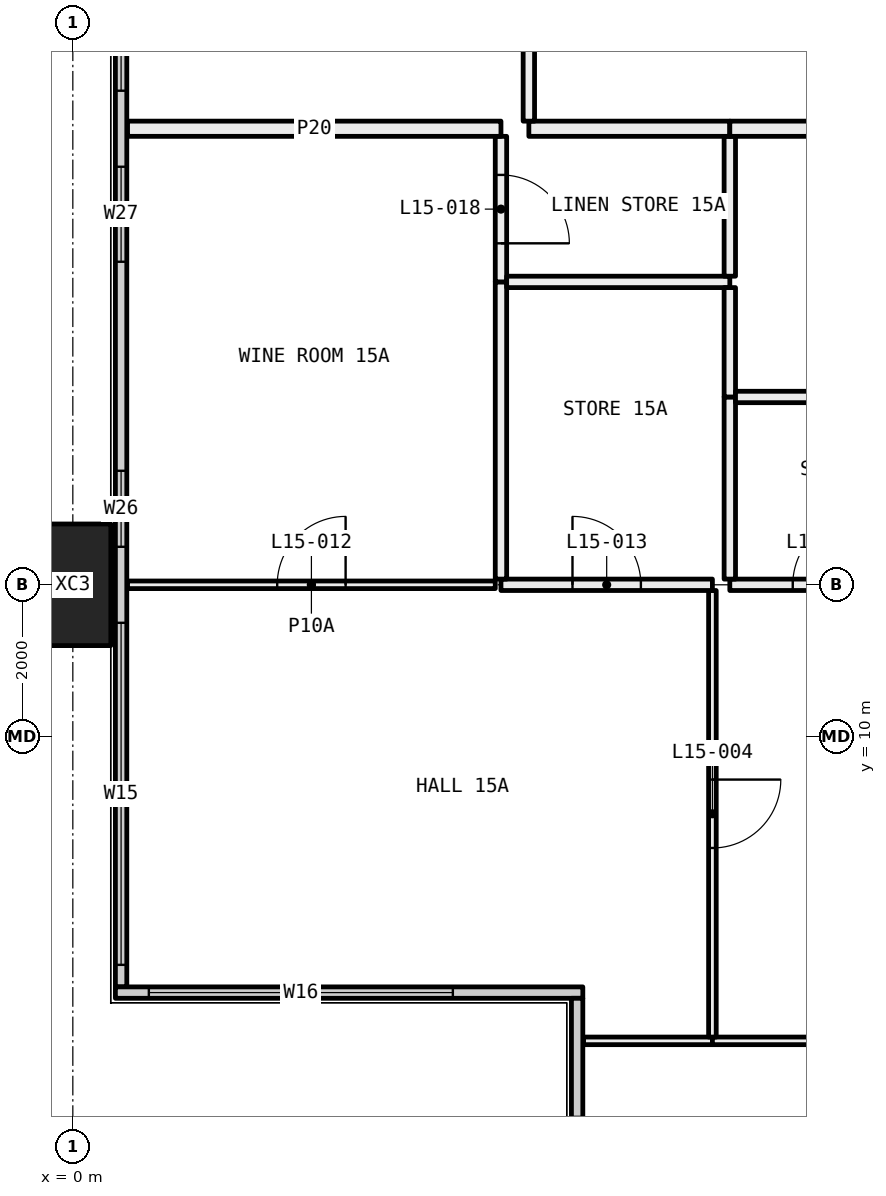
"""IFC4 building model, lengths in metres.
Left out: names, types, materials, properties, quantities, classifications, styles, units other than length and angle.
Written with IfcOpenShell. Run it as: python <this file> out.ifc"""

import sys

from ifc_helpers import new_model, si_unit, direction, frame, frame_2d, origin, origin_2d, place, context, subcontext, project, spatial, rectangle, hollow_rectangle, extrude, element, fill, save


model = new_model("IFC4")
c1 = context("Model", 3, precision=1e-05, world=origin(), true_north=direction((0.0, 1.0)))
c2 = subcontext(c1, "Body", "Model", "MODEL_VIEW")
j1 = project(units=[si_unit("LENGTHUNIT", "METRE"), si_unit("PLANEANGLEUNIT", "RADIAN")], contexts=[c1])
p1 = place(None, origin())
s1 = spatial("IfcSite", under=j1, at=p1, CompositionType="ELEMENT")
p2 = place(p1, origin())
s2 = spatial("IfcBuilding", under=s1, at=p2, CompositionType="ELEMENT")
p3 = place(p2, frame((0.0, 0.0, 64.5)))
s3 = spatial("IfcBuildingStorey", under=s2, at=p3, CompositionType="ELEMENT", Elevation=64.5)
p4 = place(p3, frame((0.0, 12.0, -0.4), z_axis=(0.0, 0.0, 1.0), x_axis=(0.0, 1.0, 0.0)))
e1 = element("IfcColumn", 1, at=p4, inside=s3, PredefinedType="COLUMN", context=c2, shape_type="SweptSolid", body=[
    extrude(hollow_rectangle(XDim=1.6, YDim=1.0, WallThickness=0.065, at=origin_2d()), origin(), (0.0, 0.0, 1.0), 3.45),
])
p5 = place(p3, frame((0.635, 6.71, 0.0), z_axis=(0.0, 0.0, 1.0), x_axis=(0.0, 1.0, 0.0)))
e2 = element("IfcWall", 2, at=p5, inside=s3, PredefinedType="ELEMENTEDWALL", context=c2, shape_type="SweptSolid", body=[
    extrude(rectangle(XDim=34.58, YDim=0.15, at=frame_2d((17.29, 0.0))), origin(), (0.0, 0.0, 1.0), 3.05),
])
p6 = place(p5, frame((0.29, 0.0, 0.45)))
e3 = element("IfcOpeningElement", 3, at=p6, cuts=e2, PredefinedType="OPENING", context=c2, shape_type="SweptSolid", body=[
    extrude(rectangle(XDim=4.5, YDim=2.55, at=frame_2d((2.25, 1.275))), frame((0.0, 0.085, 0.0), z_axis=(0.0, -1.0, 0.0), x_axis=(1.0, 0.0, 0.0)), (0.0, 0.0, 1.0), 0.17),
])
p7 = place(p5, frame((5.79, 0.0, 0.45)))
e4 = element("IfcOpeningElement", 4, at=p7, cuts=e2, PredefinedType="OPENING", context=c2, shape_type="SweptSolid", body=[
    extrude(rectangle(XDim=1.0, YDim=2.55, at=frame_2d((0.5, 1.275))), frame((0.0, 0.085, 0.0), z_axis=(0.0, -1.0, 0.0), x_axis=(1.0, 0.0, 0.0)), (0.0, 0.0, 1.0), 0.17),
])
p8 = place(p5, frame((9.54, 0.0, 0.45)))
e5 = element("IfcOpeningElement", 5, at=p8, cuts=e2, PredefinedType="OPENING", context=c2, shape_type="SweptSolid", body=[
    extrude(rectangle(XDim=1.25, YDim=2.55, at=frame_2d((0.625, 1.275))), frame((0.0, 0.085, 0.0), z_axis=(0.0, -1.0, 0.0), x_axis=(1.0, 0.0, 0.0)), (0.0, 0.0, 1.0), 0.17),
])
p9 = place(p5, frame((11.79, 0.0, 0.45)))
e6 = element("IfcOpeningElement", 6, at=p9, cuts=e2, PredefinedType="OPENING", context=c2, shape_type="SweptSolid", body=[
    extrude(rectangle(XDim=1.25, YDim=2.55, at=frame_2d((0.625, 1.275))), frame((0.0, 0.085, 0.0), z_axis=(0.0, -1.0, 0.0), x_axis=(1.0, 0.0, 0.0)), (0.0, 0.0, 1.0), 0.17),
])
p10 = place(p5, frame((15.79, 0.0, 0.45)))
e7 = element("IfcOpeningElement", 7, at=p10, cuts=e2, PredefinedType="OPENING", context=c2, shape_type="SweptSolid", body=[
    extrude(rectangle(XDim=1.0, YDim=2.55, at=frame_2d((0.5, 1.275))), frame((0.0, 0.085, 0.0), z_axis=(0.0, -1.0, 0.0), x_axis=(1.0, 0.0, 0.0)), (0.0, 0.0, 1.0), 0.17),
])
p11 = place(p5, frame((17.79, 0.0, 0.45)))
e8 = element("IfcOpeningElement", 8, at=p11, cuts=e2, PredefinedType="OPENING", context=c2, shape_type="SweptSolid", body=[
    extrude(rectangle(XDim=1.0, YDim=2.55, at=frame_2d((0.5, 1.275))), frame((0.0, 0.085, 0.0), z_axis=(0.0, -1.0, 0.0), x_axis=(1.0, 0.0, 0.0)), (0.0, 0.0, 1.0), 0.17),
])
p12 = place(p5, frame((21.54, 0.0, 0.45)))
e9 = element("IfcOpeningElement", 9, at=p12, cuts=e2, PredefinedType="OPENING", context=c2, shape_type="SweptSolid", body=[
    extrude(rectangle(XDim=1.25, YDim=2.55, at=frame_2d((0.625, 1.275))), frame((0.0, 0.085, 0.0), z_axis=(0.0, -1.0, 0.0), x_axis=(1.0, 0.0, 0.0)), (0.0, 0.0, 1.0), 0.17),
])
p13 = place(p5, frame((23.79, 0.0, 0.45)))
e10 = element("IfcOpeningElement", 10, at=p13, cuts=e2, PredefinedType="OPENING", context=c2, shape_type="SweptSolid", body=[
    extrude(rectangle(XDim=1.25, YDim=2.55, at=frame_2d((0.625, 1.275))), frame((0.0, 0.085, 0.0), z_axis=(0.0, -1.0, 0.0), x_axis=(1.0, 0.0, 0.0)), (0.0, 0.0, 1.0), 0.17),
])
p14 = place(p5, frame((27.79, 0.0, 0.45)))
e11 = element("IfcOpeningElement", 11, at=p14, cuts=e2, PredefinedType="OPENING", context=c2, shape_type="SweptSolid", body=[
    extrude(rectangle(XDim=1.0, YDim=2.55, at=frame_2d((0.5, 1.275))), frame((0.0, 0.085, 0.0), z_axis=(0.0, -1.0, 0.0), x_axis=(1.0, 0.0, 0.0)), (0.0, 0.0, 1.0), 0.17),
])
p15 = place(p5, frame((29.79, 0.0, 0.45)))
e12 = element("IfcOpeningElement", 12, at=p15, cuts=e2, PredefinedType="OPENING", context=c2, shape_type="SweptSolid", body=[
    extrude(rectangle(XDim=4.5, YDim=2.55, at=frame_2d((2.25, 1.275))), frame((0.0, 0.085, 0.0), z_axis=(0.0, -1.0, 0.0), x_axis=(1.0, 0.0, 0.0)), (0.0, 0.0, 1.0), 0.17),
])
p16 = place(p3, frame((0.56, 6.635, 0.0), z_axis=(0.0, 0.0, 1.0), x_axis=(1.0, 0.0, 0.0)))
e13 = element("IfcWall", 13, at=p16, inside=s3, PredefinedType="ELEMENTEDWALL", context=c2, shape_type="SweptSolid", body=[
    extrude(rectangle(XDim=6.15, YDim=0.15, at=frame_2d((3.075, 0.0))), origin(), (0.0, 0.0, 1.0), 3.05),
])
p17 = place(p16, frame((0.44, 0.0, 0.45)))
e14 = element("IfcOpeningElement", 14, at=p17, cuts=e13, PredefinedType="OPENING", context=c2, shape_type="SweptSolid", body=[
    extrude(rectangle(XDim=4.0, YDim=2.55, at=frame_2d((2.0, 1.275))), frame((0.0, 0.085, 0.0), z_axis=(0.0, -1.0, 0.0), x_axis=(1.0, 0.0, 0.0)), (0.0, 0.0, 1.0), 0.17),
])
p18 = place(p3, frame((6.635, 0.71, 0.0), z_axis=(0.0, 0.0, 1.0), x_axis=(0.0, 1.0, 0.0)))
e15 = element("IfcWall", 15, at=p18, inside=s3, PredefinedType="ELEMENTEDWALL", context=c2, shape_type="SweptSolid", body=[
    extrude(rectangle(XDim=5.85, YDim=0.15, at=frame_2d((2.925, 0.0))), origin(), (0.0, 0.0, 1.0), 3.05),
])
p19 = place(p18, frame((0.29, 0.0, 0.45)))
e16 = element("IfcOpeningElement", 16, at=p19, cuts=e15, PredefinedType="OPENING", context=c2, shape_type="SweptSolid", body=[
    extrude(rectangle(XDim=4.0, YDim=2.55, at=frame_2d((2.0, 1.275))), frame((0.0, 0.085, 0.0), z_axis=(0.0, -1.0, 0.0), x_axis=(1.0, 0.0, 0.0)), (0.0, 0.0, 1.0), 0.17),
])
p20 = place(p3, frame((8.415, 6.0, 0.0), z_axis=(0.0, 0.0, 1.0), x_axis=(-1.0, 0.0, 0.0)))
e17 = element("IfcWall", 17, at=p20, inside=s3, PredefinedType="PARTITIONING", context=c2, shape_type="SweptSolid", body=[
    extrude(rectangle(XDim=1.695, YDim=0.1, at=frame_2d((0.848, 0.0))), origin(), (0.0, 0.0, 1.0), 3.05),
])
p21 = place(p3, frame((11.95, 6.0, 0.0), z_axis=(0.0, 0.0, 1.0), x_axis=(-1.0, 0.0, 0.0)))
e18 = element("IfcWall", 18, at=p21, inside=s3, PredefinedType="PARTITIONING", context=c2, shape_type="SweptSolid", body=[
    extrude(rectangle(XDim=3.535, YDim=0.1, at=frame_2d((1.768, 0.0))), origin(), (0.0, 0.0, 1.0), 2.45),
])
p22 = place(p21, frame((1.317, 0.0, 0.0)))
e19 = element("IfcOpeningElement", 19, at=p22, cuts=e18, PredefinedType="OPENING", context=c2, shape_type="SweptSolid", body=[
    extrude(rectangle(XDim=0.9, YDim=2.1, at=frame_2d((0.45, 1.05))), frame((0.0, 0.06, 0.0), z_axis=(0.0, -1.0, 0.0), x_axis=(1.0, 0.0, 0.0)), (0.0, 0.0, 1.0), 0.12),
])
p23 = place(p3, frame((8.415, 6.05, 0.0), z_axis=(0.0, 0.0, 1.0), x_axis=(0.0, 1.0, 0.0)))
e20 = element("IfcWall", 20, at=p23, inside=s3, PredefinedType="PARTITIONING", context=c2, shape_type="SweptSolid", body=[
    extrude(rectangle(XDim=5.875, YDim=0.1, at=frame_2d((2.938, 0.0))), origin(), (0.0, 0.0, 1.0), 2.45),
])
p24 = place(p23, frame((2.488, 0.0, 0.0)))
e21 = element("IfcOpeningElement", 21, at=p24, cuts=e20, PredefinedType="OPENING", context=c2, shape_type="SweptSolid", body=[
    extrude(rectangle(XDim=0.9, YDim=2.1, at=frame_2d((0.45, 1.05))), frame((0.0, 0.06, 0.0), z_axis=(0.0, -1.0, 0.0), x_axis=(1.0, 0.0, 0.0)), (0.0, 0.0, 1.0), 0.12),
])
p25 = place(p3, frame((5.558, 12.0, 0.0), z_axis=(0.0, 0.0, 1.0), x_axis=(-1.0, 0.0, 0.0)))
e22 = element("IfcWall", 22, at=p25, inside=s3, PredefinedType="PARTITIONING", context=c2, shape_type="SweptSolid", body=[
    extrude(rectangle(XDim=4.838, YDim=0.1, at=frame_2d((2.419, 0.0))), origin(), (0.0, 0.0, 1.0), 2.45),
])
p26 = place(p25, frame((1.969, 0.0, 0.0)))
e23 = element("IfcOpeningElement", 23, at=p26, cuts=e22, PredefinedType="OPENING", context=c2, shape_type="SweptSolid", body=[
    extrude(rectangle(XDim=0.9, YDim=2.1, at=frame_2d((0.45, 1.05))), frame((0.0, 0.06, 0.0), z_axis=(0.0, -1.0, 0.0), x_axis=(1.0, 0.0, 0.0)), (0.0, 0.0, 1.0), 0.12),
])
p27 = place(p3, frame((8.415, 12.0, 0.0), z_axis=(0.0, 0.0, 1.0), x_axis=(-1.0, 0.0, 0.0)))
e24 = element("IfcWall", 24, at=p27, inside=s3, PredefinedType="PARTITIONING", context=c2, shape_type="SweptSolid", body=[
    extrude(rectangle(XDim=2.782, YDim=0.15, at=frame_2d((1.391, 0.0))), origin(), (0.0, 0.0, 1.0), 2.45),
])
p28 = place(p27, frame((0.941, 0.0, 0.0)))
e25 = element("IfcOpeningElement", 25, at=p28, cuts=e24, PredefinedType="OPENING", context=c2, shape_type="SweptSolid", body=[
    extrude(rectangle(XDim=0.9, YDim=2.1, at=frame_2d((0.45, 1.05))), frame((0.0, 0.085, 0.0), z_axis=(0.0, -1.0, 0.0), x_axis=(1.0, 0.0, 0.0)), (0.0, 0.0, 1.0), 0.17),
])
p29 = place(p3, frame((11.2, 12.0, 0.0), z_axis=(0.0, 0.0, 1.0), x_axis=(-1.0, 0.0, 0.0)))
e26 = element("IfcWall", 26, at=p29, inside=s3, PredefinedType="PARTITIONING", context=c2, shape_type="SweptSolid", body=[
    extrude(rectangle(XDim=2.556, YDim=0.15, at=frame_2d((1.278, 0.0))), origin(), (0.0, 0.0, 1.0), 2.45),
])
p30 = place(p29, frame((0.828, 0.0, 0.0)))
e27 = element("IfcOpeningElement", 27, at=p30, cuts=e26, PredefinedType="OPENING", context=c2, shape_type="SweptSolid", body=[
    extrude(rectangle(XDim=0.9, YDim=2.1, at=frame_2d((0.45, 1.05))), frame((0.0, 0.085, 0.0), z_axis=(0.0, -1.0, 0.0), x_axis=(1.0, 0.0, 0.0)), (0.0, 0.0, 1.0), 0.17),
])
p31 = place(p3, frame((5.633, 12.075, 0.0), z_axis=(0.0, 0.0, 1.0), x_axis=(0.0, 1.0, 0.0)))
e28 = element("IfcWall", 28, at=p31, inside=s3, PredefinedType="PARTITIONING", context=c2, shape_type="SweptSolid", body=[
    extrude(rectangle(XDim=3.91, YDim=0.15, at=frame_2d((1.955, 0.0))), origin(), (0.0, 0.0, 1.0), 2.45),
])
p32 = place(p3, frame((5.633, 15.985, 0.0), z_axis=(0.0, 0.0, 1.0), x_axis=(0.0, 1.0, 0.0)))
e29 = element("IfcWall", 29, at=p32, inside=s3, PredefinedType="PARTITIONING", context=c2, shape_type="SweptSolid", body=[
    extrude(rectangle(XDim=1.915, YDim=0.15, at=frame_2d((0.958, 0.0))), origin(), (0.0, 0.0, 1.0), 3.05),
])
p33 = place(p32, frame((0.508, 0.0, 0.0)))
e30 = element("IfcOpeningElement", 30, at=p33, cuts=e29, PredefinedType="OPENING", context=c2, shape_type="SweptSolid", body=[
    extrude(rectangle(XDim=0.9, YDim=2.1, at=frame_2d((0.45, 1.05))), frame((0.0, 0.085, 0.0), z_axis=(0.0, -1.0, 0.0), x_axis=(1.0, 0.0, 0.0)), (0.0, 0.0, 1.0), 0.17),
])
p34 = place(p3, frame((5.633, 18.0, 0.0), z_axis=(0.0, 0.0, 1.0), x_axis=(-1.0, 0.0, 0.0)))
e31 = element("IfcWall", 31, at=p34, inside=s3, PredefinedType="PARTITIONING", context=c2, shape_type="SweptSolid", body=[
    extrude(rectangle(XDim=4.913, YDim=0.2, at=frame_2d((2.457, 0.0))), origin(), (0.0, 0.0, 1.0), 3.05),
])
p35 = place(p3, frame((8.644, 15.985, 0.0), z_axis=(0.0, 0.0, 1.0), x_axis=(-1.0, 0.0, 0.0)))
e32 = element("IfcWall", 32, at=p35, inside=s3, PredefinedType="PARTITIONING", context=c2, shape_type="SweptSolid", body=[
    extrude(rectangle(XDim=2.936, YDim=0.15, at=frame_2d((1.468, 0.0))), origin(), (0.0, 0.0, 1.0), 3.05),
])
p36 = place(p3, frame((8.644, 12.075, 0.0), z_axis=(0.0, 0.0, 1.0), x_axis=(0.0, 1.0, 0.0)))
e33 = element("IfcWall", 33, at=p36, inside=s3, PredefinedType="PARTITIONING", context=c2, shape_type="SweptSolid", body=[
    extrude(rectangle(XDim=2.396, YDim=0.15, at=frame_2d((1.198, 0.0))), origin(), (0.0, 0.0, 1.0), 2.45),
])
p37 = place(p3, frame((8.644, 14.471, 0.0), z_axis=(0.0, 0.0, 1.0), x_axis=(0.0, 1.0, 0.0)))
e34 = element("IfcWall", 34, at=p37, inside=s3, PredefinedType="PARTITIONING", context=c2, shape_type="SweptSolid", body=[
    extrude(rectangle(XDim=1.439, YDim=0.15, at=frame_2d((0.719, 0.0))), origin(), (0.0, 0.0, 1.0), 3.05),
])
p38 = place(p3, frame((8.644, 16.06, 0.0), z_axis=(0.0, 0.0, 1.0), x_axis=(0.0, 1.0, 0.0)))
e35 = element("IfcWall", 35, at=p38, inside=s3, PredefinedType="PARTITIONING", context=c2, shape_type="SweptSolid", body=[
    extrude(rectangle(XDim=1.84, YDim=0.15, at=frame_2d((0.92, 0.0))), origin(), (0.0, 0.0, 1.0), 3.05),
])
p39 = place(p3, frame((8.644, 18.0, 0.0), z_axis=(0.0, 0.0, 1.0), x_axis=(-1.0, 0.0, 0.0)))
e36 = element("IfcWall", 36, at=p39, inside=s3, PredefinedType="PARTITIONING", context=c2, shape_type="SweptSolid", body=[
    extrude(rectangle(XDim=2.644, YDim=0.2, at=frame_2d((1.322, 0.0))), origin(), (0.0, 0.0, 1.0), 3.05),
])
p40 = place(p3, frame((13.5, 14.471, 0.0), z_axis=(0.0, 0.0, 1.0), x_axis=(-1.0, 0.0, 0.0)))
e37 = element("IfcWall", 37, at=p40, inside=s3, PredefinedType="PARTITIONING", context=c2, shape_type="SweptSolid", body=[
    extrude(rectangle(XDim=4.781, YDim=0.15, at=frame_2d((2.391, 0.0))), origin(), (0.0, 0.0, 1.0), 3.05),
])
p41 = place(p3, frame((10.1, 18.0, 0.0), z_axis=(0.0, 0.0, 1.0), x_axis=(-1.0, 0.0, 0.0)))
e38 = element("IfcWall", 38, at=p41, inside=s3, PredefinedType="PARTITIONING", context=c2, shape_type="SweptSolid", body=[
    extrude(rectangle(XDim=1.456, YDim=0.2, at=frame_2d((0.728, 0.0))), origin(), (0.0, 0.0, 1.0), 3.05),
])
p42 = place(p3, frame((6.0, 18.1, 0.0), z_axis=(0.0, 0.0, 1.0), x_axis=(0.0, 1.0, 0.0)))
e39 = element("IfcWall", 39, at=p42, inside=s3, PredefinedType="PARTITIONING", context=c2, shape_type="SweptSolid", body=[
    extrude(rectangle(XDim=4.4, YDim=0.15, at=frame_2d((2.2, 0.0))), origin(), (0.0, 0.0, 1.0), 3.05),
])
p43 = place(p42, frame((1.75, 0.0, 0.0)))
e40 = element("IfcOpeningElement", 40, at=p43, cuts=e39, PredefinedType="OPENING", context=c2, shape_type="SweptSolid", body=[
    extrude(rectangle(XDim=0.9, YDim=2.1, at=frame_2d((0.45, 1.05))), frame((0.0, 0.085, 0.0), z_axis=(0.0, -1.0, 0.0), x_axis=(1.0, 0.0, 0.0)), (0.0, 0.0, 1.0), 0.17),
])
p44 = place(p6, origin())
e41 = element("IfcWindow", 41, at=p44, inside=s3, PartitioningType="SINGLE_PANEL", PredefinedType="WINDOW", context=c2, shape_type="SweptSolid", body=[
    extrude(rectangle(XDim=4.5, YDim=2.55, at=frame_2d((2.25, 1.275))), frame((0.0, 0.03, 0.0), z_axis=(0.0, -1.0, 0.0), x_axis=(1.0, 0.0, 0.0)), (0.0, 0.0, 1.0), 0.06),
])
fill(e3, e41)
p45 = place(p7, origin())
e42 = element("IfcWindow", 42, at=p45, inside=s3, PartitioningType="SINGLE_PANEL", PredefinedType="WINDOW", context=c2, shape_type="SweptSolid", body=[
    extrude(rectangle(XDim=1.0, YDim=2.55, at=frame_2d((0.5, 1.275))), frame((0.0, 0.03, 0.0), z_axis=(0.0, -1.0, 0.0), x_axis=(1.0, 0.0, 0.0)), (0.0, 0.0, 1.0), 0.06),
])
fill(e4, e42)
p46 = place(p8, origin())
e43 = element("IfcWindow", 43, at=p46, inside=s3, PartitioningType="SINGLE_PANEL", PredefinedType="WINDOW", context=c2, shape_type="SweptSolid", body=[
    extrude(rectangle(XDim=1.25, YDim=2.55, at=frame_2d((0.625, 1.275))), frame((0.0, 0.03, 0.0), z_axis=(0.0, -1.0, 0.0), x_axis=(1.0, 0.0, 0.0)), (0.0, 0.0, 1.0), 0.06),
])
fill(e5, e43)
p47 = place(p9, origin())
e44 = element("IfcWindow", 44, at=p47, inside=s3, PartitioningType="SINGLE_PANEL", PredefinedType="WINDOW", context=c2, shape_type="SweptSolid", body=[
    extrude(rectangle(XDim=1.25, YDim=2.55, at=frame_2d((0.625, 1.275))), frame((0.0, 0.03, 0.0), z_axis=(0.0, -1.0, 0.0), x_axis=(1.0, 0.0, 0.0)), (0.0, 0.0, 1.0), 0.06),
])
fill(e6, e44)
p48 = place(p17, origin())
e45 = element("IfcWindow", 45, at=p48, inside=s3, PartitioningType="SINGLE_PANEL", PredefinedType="WINDOW", context=c2, shape_type="SweptSolid", body=[
    extrude(rectangle(XDim=4.0, YDim=2.55, at=frame_2d((2.0, 1.275))), frame((0.0, 0.03, 0.0), z_axis=(0.0, -1.0, 0.0), x_axis=(1.0, 0.0, 0.0)), (0.0, 0.0, 1.0), 0.06),
])
fill(e14, e45)
p49 = place(p24, frame((0.9, 0.0, 0.0), x_axis=(-1.0, 0.0, 0.0)))
e46 = element("IfcDoor", 46, at=p49, inside=s3, OperationType="SINGLE_SWING_RIGHT", PredefinedType="DOOR", context=c2, shape_type="SweptSolid", body=[
    extrude(rectangle(XDim=0.9, YDim=2.1, at=frame_2d((0.45, 1.05))), frame((0.0, 0.025, 0.0), z_axis=(0.0, -1.0, 0.0), x_axis=(1.0, 0.0, 0.0)), (0.0, 0.0, 1.0), 0.05),
])
fill(e21, e46)
p50 = place(p26, frame((0.9, 0.0, 0.0), x_axis=(-1.0, 0.0, 0.0)))
e47 = element("IfcDoor", 47, at=p50, inside=s3, OperationType="SINGLE_SWING_LEFT", PredefinedType="DOOR", context=c2, shape_type="SweptSolid", body=[
    extrude(rectangle(XDim=0.9, YDim=2.1, at=frame_2d((0.45, 1.05))), frame((0.0, 0.025, 0.0), z_axis=(0.0, -1.0, 0.0), x_axis=(1.0, 0.0, 0.0)), (0.0, 0.0, 1.0), 0.05),
])
fill(e23, e47)
p51 = place(p28, frame((0.9, 0.0, 0.0), x_axis=(-1.0, 0.0, 0.0)))
e48 = element("IfcDoor", 48, at=p51, inside=s3, OperationType="SINGLE_SWING_RIGHT", PredefinedType="DOOR", context=c2, shape_type="SweptSolid", body=[
    extrude(rectangle(XDim=0.9, YDim=2.1, at=frame_2d((0.45, 1.05))), frame((0.0, 0.025, 0.0), z_axis=(0.0, -1.0, 0.0), x_axis=(1.0, 0.0, 0.0)), (0.0, 0.0, 1.0), 0.05),
])
fill(e25, e48)
p52 = place(p30, frame((0.9, 0.0, 0.0), x_axis=(-1.0, 0.0, 0.0)))
e49 = element("IfcDoor", 49, at=p52, inside=s3, OperationType="SINGLE_SWING_LEFT", PredefinedType="DOOR", context=c2, shape_type="SweptSolid", body=[
    extrude(rectangle(XDim=0.9, YDim=2.1, at=frame_2d((0.45, 1.05))), frame((0.0, 0.025, 0.0), z_axis=(0.0, -1.0, 0.0), x_axis=(1.0, 0.0, 0.0)), (0.0, 0.0, 1.0), 0.05),
])
fill(e27, e49)
p53 = place(p33, frame((0.9, 0.0, 0.0), x_axis=(-1.0, 0.0, 0.0)))
e50 = element("IfcDoor", 50, at=p53, inside=s3, OperationType="SINGLE_SWING_LEFT", PredefinedType="DOOR", context=c2, shape_type="SweptSolid", body=[
    extrude(rectangle(XDim=0.9, YDim=2.1, at=frame_2d((0.45, 1.05))), frame((0.0, 0.025, 0.0), z_axis=(0.0, -1.0, 0.0), x_axis=(1.0, 0.0, 0.0)), (0.0, 0.0, 1.0), 0.05),
])
fill(e30, e50)
save(model, sys.argv[1])
